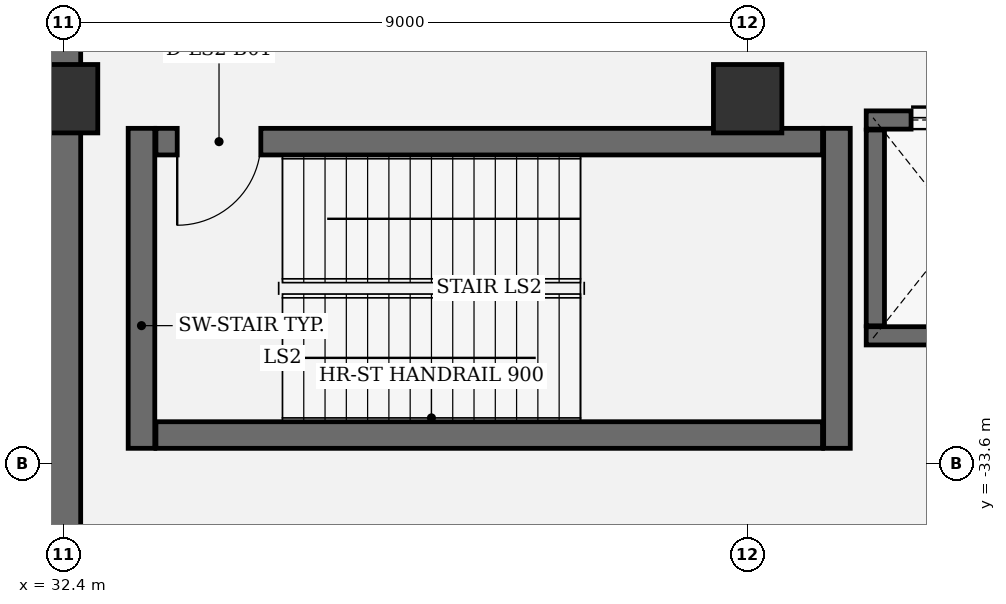
"""IFC4 building model, lengths in metres.
Left out: names, types, materials, properties, quantities, classifications, styles, units other than length and angle.
Written with IfcOpenShell. Run it as: python <this file> out.ifc"""

import sys

from ifc_helpers import new_model, si_unit, direction, frame, frame_2d, origin, origin_2d, place, context, subcontext, project, spatial, rectangle, extrude, element, fill, save


model = new_model("IFC4")
c1 = context("Model", 3, precision=1e-05, world=origin(), true_north=direction((0.0, 1.0)))
c2 = subcontext(c1, "Body", "Model", "MODEL_VIEW")
j1 = project(units=[si_unit("LENGTHUNIT", "METRE"), si_unit("PLANEANGLEUNIT", "RADIAN")], contexts=[c1])
p1 = place(None, origin())
s1 = spatial("IfcSite", under=j1, at=p1, CompositionType="ELEMENT")
p2 = place(p1, origin())
s2 = spatial("IfcBuilding", under=s1, at=p2, CompositionType="ELEMENT")
p3 = place(p2, frame((0.0, 0.0, -5.4)))
s3 = spatial("IfcBuildingStorey", under=s2, at=p3, CompositionType="ELEMENT", Elevation=-5.4)
p4 = place(p3, frame((32.4, 38.16, 0.0), z_axis=(0.0, 0.0, 1.0), x_axis=(0.0, -1.0, 0.0)))
e1 = element("IfcWall", 1, at=p4, inside=s3, PredefinedType="USERDEFINED", context=c2, shape_type="SweptSolid", body=[
    extrude(rectangle(XDim=76.32, YDim=0.45, at=frame_2d((38.16, 0.0))), origin(), (0.0, 0.0, 1.0), 4.35),
])
for number, where, z_axis, x_axis in (
    (2, (32.4, -28.8, 0.0), (0.0, 0.0, 1.0), (1.0, 0.0, 0.0)),
    (3, (41.4, -28.8, 0.0), (0.0, 0.0, 1.0), (1.0, 0.0, 0.0)),
):
    element("IfcColumn", number, at=place(p3, frame(where, z_axis=z_axis, x_axis=x_axis)), inside=s3, PredefinedType="COLUMN", context=c2, shape_type="SweptSolid", body=[
        extrude(rectangle(XDim=0.9, YDim=0.9, at=origin_2d()), origin(), (0.0, 0.0, 1.0), 5.4),
    ])
for number, where, z_axis, x_axis in (
    (4, (33.425, -29.19, 0.0), (0.0, 0.0, 1.0), (0.0, -1.0, 0.0)),
    (5, (42.575, -33.4, 0.0), (0.0, 0.0, 1.0), (0.0, 1.0, 0.0)),
):
    element("IfcWall", number, at=place(p3, frame(where, z_axis=z_axis, x_axis=x_axis)), inside=s3, PredefinedType="SHEAR", context=c2, shape_type="SweptSolid", body=[
        extrude(rectangle(XDim=4.21, YDim=0.35, at=frame_2d((2.105, 0.0))), origin(), (0.0, 0.0, 1.0), 5.395),
    ])
p5 = place(p3, frame((33.615, -33.225, 0.0), z_axis=(0.0, 0.0, 1.0), x_axis=(1.0, 0.0, 0.0)))
e6 = element("IfcWall", 6, at=p5, inside=s3, PredefinedType="SHEAR", context=c2, shape_type="SweptSolid", body=[
    extrude(rectangle(XDim=8.77, YDim=0.35, at=frame_2d((4.385, 0.0))), origin(), (0.0, 0.0, 1.0), 5.395),
])
p6 = place(p3, frame((42.385, -29.365, 0.0), z_axis=(0.0, 0.0, 1.0), x_axis=(-1.0, 0.0, 0.0)))
e7 = element("IfcWall", 7, at=p6, inside=s3, PredefinedType="SHEAR", context=c2, shape_type="SweptSolid", body=[
    extrude(rectangle(XDim=8.77, YDim=0.35, at=frame_2d((4.385, 0.0))), origin(), (0.0, 0.0, 1.0), 5.395),
])
p7 = place(p6, frame((7.39, 0.0, 0.0)))
e8 = element("IfcOpeningElement", 8, at=p7, cuts=e7, PredefinedType="OPENING", context=c2, shape_type="SweptSolid", body=[
    extrude(rectangle(XDim=1.1, YDim=2.2, at=frame_2d((0.55, 1.1))), frame((0.0, 0.185, 0.0), z_axis=(0.0, -1.0, 0.0), x_axis=(1.0, 0.0, 0.0)), (0.0, 0.0, 1.0), 0.37),
])
p8 = place(p3, frame((45.44, -31.92, 0.0), z_axis=(0.0, 0.0, 1.0), x_axis=(-1.0, 0.0, 0.0)))
e9 = element("IfcWall", 9, at=p8, inside=s3, PredefinedType="SHEAR", context=c2, shape_type="SweptSolid", body=[
    extrude(rectangle(XDim=2.48, YDim=0.24, at=frame_2d((1.24, 0.0))), origin(), (0.0, 0.0, 1.0), 5.1),
])
p9 = place(p3, frame((42.96, -29.08, 0.0), z_axis=(0.0, 0.0, 1.0), x_axis=(1.0, 0.0, 0.0)))
e10 = element("IfcWall", 10, at=p9, inside=s3, PredefinedType="SHEAR", context=c2, shape_type="SweptSolid", body=[
    extrude(rectangle(XDim=2.48, YDim=0.24, at=frame_2d((1.24, 0.0))), origin(), (0.0, 0.0, 1.0), 5.1),
])
p10 = place(p9, frame((0.59, 0.0, 0.0)))
e11 = element("IfcOpeningElement", 11, at=p10, cuts=e10, PredefinedType="OPENING", context=c2, shape_type="SweptSolid", body=[
    extrude(rectangle(XDim=1.3, YDim=2.3, at=frame_2d((0.65, 1.15))), frame((0.0, 0.13, 0.0), z_axis=(0.0, -1.0, 0.0), x_axis=(1.0, 0.0, 0.0)), (0.0, 0.0, 1.0), 0.26),
])
p11 = place(p3, frame((43.08, -31.788, 0.0), z_axis=(0.0, 0.0, 1.0), x_axis=(0.0, 1.0, 0.0)))
e12 = element("IfcWall", 12, at=p11, inside=s3, PredefinedType="SHEAR", context=c2, shape_type="SweptSolid", body=[
    extrude(rectangle(XDim=2.576, YDim=0.24, at=frame_2d((1.288, 0.0))), origin(), (0.0, 0.0, 1.0), 5.1),
])
p12 = place(p7, origin())
e13 = element("IfcDoor", 13, at=p12, inside=s3, OperationType="SINGLE_SWING_RIGHT", PredefinedType="DOOR", context=c2, shape_type="SweptSolid", body=[
    extrude(rectangle(XDim=1.1, YDim=2.2, at=frame_2d((0.55, 1.1))), frame((0.0, 0.025, 0.0), z_axis=(0.0, -1.0, 0.0), x_axis=(1.0, 0.0, 0.0)), (0.0, 0.0, 1.0), 0.05),
])
fill(e8, e13)
p13 = place(p10, origin())
e14 = element("IfcDoor", 14, at=p13, inside=s3, OperationType="DOUBLE_DOOR_SLIDING", PredefinedType="DOOR", context=c2, shape_type="SweptSolid", body=[
    extrude(rectangle(XDim=1.3, YDim=2.3, at=frame_2d((0.65, 1.15))), frame((0.0, 0.025, 0.0), z_axis=(0.0, -1.0, 0.0), x_axis=(1.0, 0.0, 0.0)), (0.0, 0.0, 1.0), 0.05),
])
fill(e11, e14)
save(model, sys.argv[1])
